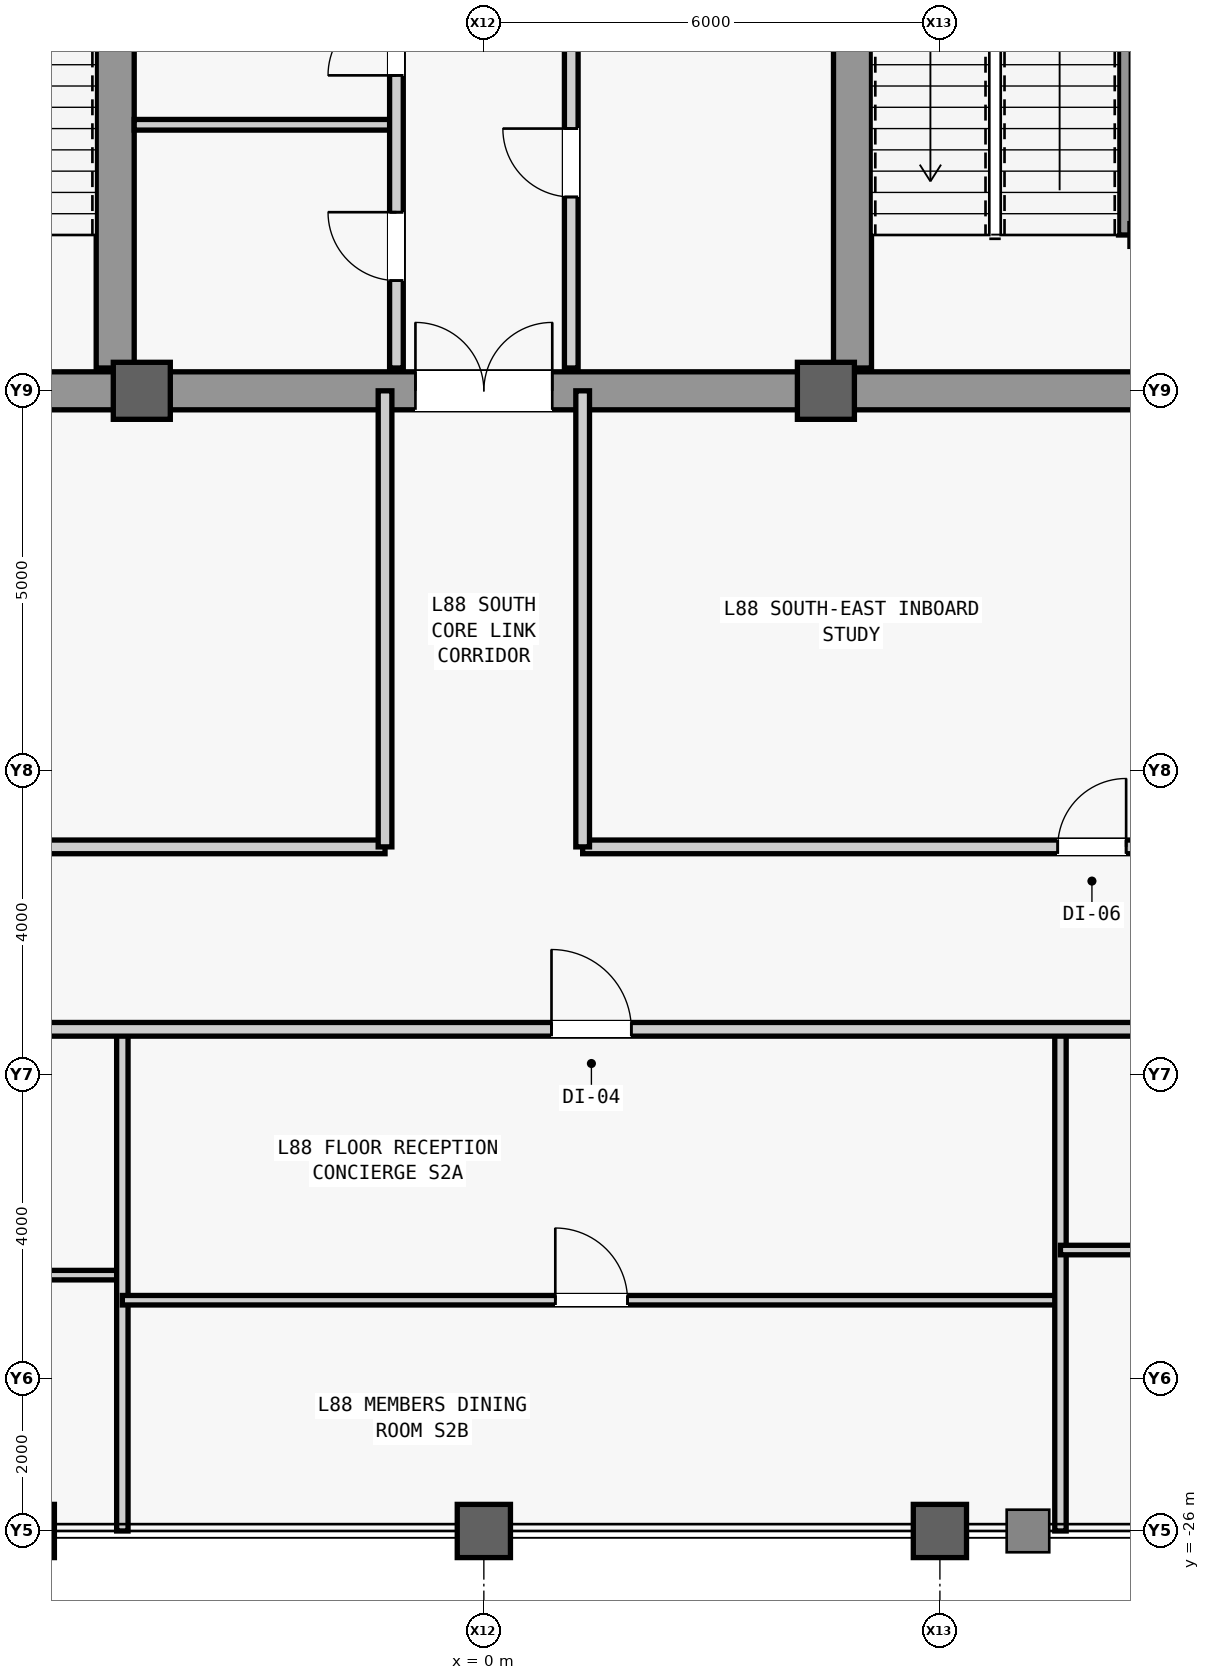
"""IFC4 building model, lengths in metres.
Left out: names, types, materials, properties, quantities, classifications, styles, units other than length and angle.
Written with IfcOpenShell. Run it as: python <this file> out.ifc"""

import sys

from ifc_helpers import new_model, si_unit, direction, frame, frame_2d, origin, origin_2d, place, context, subcontext, project, spatial, rectangle, hollow_rectangle, extrude, source, transform, mapped, element, fill, save


model = new_model("IFC4")
c1 = context("Model", 3, precision=1e-05, world=origin(), true_north=direction((0.0, 1.0)))
c2 = subcontext(c1, "Body", "Model", "MODEL_VIEW")
j1 = project(units=[si_unit("LENGTHUNIT", "METRE"), si_unit("PLANEANGLEUNIT", "RADIAN")], contexts=[c1])
p1 = place(None, origin())
s1 = spatial("IfcSite", under=j1, at=p1, CompositionType="ELEMENT")
p2 = place(p1, origin())
s2 = spatial("IfcBuilding", under=s1, at=p2, CompositionType="ELEMENT")
p3 = place(p2, frame((0.0, 0.0, 370.3)))
s3 = spatial("IfcBuildingStorey", under=s2, at=p3, CompositionType="ELEMENT", Elevation=370.3)
m1 = source(origin(), c2, "Body", "SweptSolid", [
    extrude(rectangle(XDim=21.4, YDim=0.5, at=frame_2d((10.7, 0.0))), origin(), (0.0, 0.0, 1.0), 4.6),
])
for number, where, z_axis, x_axis in (
    (1, (-4.85, -10.7, 0.0), (0.0, 0.0, 1.0), (0.0, 1.0, 0.0)),
    (2, (4.85, -10.7, 0.0), (0.0, 0.0, 1.0), (0.0, 1.0, 0.0)),
):
    element("IfcWall", number, at=place(p3, frame(where, z_axis=z_axis, x_axis=x_axis)), inside=s3, PredefinedType="SHEAR", context=c2, shape_type="MappedRepresentation", body=[
        mapped(m1, transform((0.0, 0.0, 0.0), scale=1.0)),
    ])
m2 = source(origin(), c2, "Body", "SweptSolid", [
    extrude(rectangle(XDim=5.9, YDim=0.5, at=frame_2d((2.95, 0.0))), origin(), (0.0, 0.0, 1.0), 4.6),
])
for number, where, z_axis, x_axis in (
    (3, (-10.75, -11.0, 0.0), (0.0, 0.0, 1.0), (1.0, 0.0, 0.0)),
    (4, (4.85, -11.0, 0.0), (0.0, 0.0, 1.0), (1.0, 0.0, 0.0)),
):
    element("IfcWall", number, at=place(p3, frame(where, z_axis=z_axis, x_axis=x_axis)), inside=s3, PredefinedType="SHEAR", context=c2, shape_type="MappedRepresentation", body=[
        mapped(m2, transform((0.0, 0.0, 0.0), scale=1.0)),
    ])
m3 = source(origin(), c2, "Body", "SweptSolid", [
    extrude(rectangle(XDim=9.2, YDim=0.5, at=frame_2d((4.6, 0.0))), origin(), (0.0, 0.0, 1.0), 4.6),
])
p4 = place(p3, frame((-4.6, -11.0, 0.0), z_axis=(0.0, 0.0, 1.0), x_axis=(1.0, 0.0, 0.0)))
e5 = element("IfcWall", 5, at=p4, inside=s3, PredefinedType="SHEAR", context=c2, shape_type="MappedRepresentation", body=[
    mapped(m3, transform((0.0, 0.0, 0.0), scale=1.0)),
])
m4 = source(origin(), c2, "Body", "SweptSolid", [
    extrude(rectangle(XDim=1.8, YDim=2.25, at=frame_2d((0.9, 1.125))), frame((0.0, 0.26, 0.0), z_axis=(0.0, -1.0, 0.0), x_axis=(1.0, 0.0, 0.0)), (0.0, 0.0, 1.0), 0.52),
])
p5 = place(p4, frame((3.7, 0.0, 0.0)))
e6 = element("IfcOpeningElement", 6, at=p5, cuts=e5, PredefinedType="OPENING", context=c2, shape_type="MappedRepresentation", body=[
    mapped(m4, transform((0.0, 0.0, 0.0), scale=1.0)),
])
m5 = source(origin(), c2, "Body", "SweptSolid", [
    extrude(hollow_rectangle(XDim=0.7, YDim=0.7, WallThickness=0.04, at=origin_2d()), origin(), (0.0, 0.0, 1.0), 5.2),
])
p6 = place(p3, frame((-6.0, -26.0, 0.0), z_axis=(0.0, 0.0, 1.0), x_axis=(1.0, 0.0, 0.0)))
e7 = element("IfcColumn", 7, at=p6, inside=s3, PredefinedType="COLUMN", context=c2, shape_type="MappedRepresentation", body=[
    mapped(m5, transform((0.0, 0.0, 0.0), scale=1.0)),
])
m6 = source(origin(), c2, "Body", "SweptSolid", [
    extrude(rectangle(XDim=0.75, YDim=0.75, at=origin_2d()), origin(), (0.0, 0.0, 1.0), 5.2),
])
p7 = place(p3, frame((-4.5, -11.0, 0.0), z_axis=(0.0, 0.0, 1.0), x_axis=(1.0, 0.0, 0.0)))
e8 = element("IfcColumn", 8, at=p7, inside=s3, PredefinedType="COLUMN", context=c2, shape_type="MappedRepresentation", body=[
    mapped(m6, transform((0.0, 0.0, 0.0), scale=1.0)),
])
p8 = place(p3, frame((0.0, -26.0, 0.0), z_axis=(0.0, 0.0, 1.0), x_axis=(1.0, 0.0, 0.0)))
e9 = element("IfcColumn", 9, at=p8, inside=s3, PredefinedType="COLUMN", context=c2, shape_type="MappedRepresentation", body=[
    mapped(m5, transform((0.0, 0.0, 0.0), scale=1.0)),
])
p9 = place(p3, frame((4.5, -11.0, 0.0), z_axis=(0.0, 0.0, 1.0), x_axis=(1.0, 0.0, 0.0)))
e10 = element("IfcColumn", 10, at=p9, inside=s3, PredefinedType="COLUMN", context=c2, shape_type="MappedRepresentation", body=[
    mapped(m6, transform((0.0, 0.0, 0.0), scale=1.0)),
])
p10 = place(p3, frame((6.0, -26.0, 0.0), z_axis=(0.0, 0.0, 1.0), x_axis=(1.0, 0.0, 0.0)))
e11 = element("IfcColumn", 11, at=p10, inside=s3, PredefinedType="COLUMN", context=c2, shape_type="MappedRepresentation", body=[
    mapped(m5, transform((0.0, 0.0, 0.0), scale=1.0)),
])
m7 = source(origin(), c2, "Body", "SweptSolid", [
    extrude(rectangle(XDim=7.8, YDim=0.3, at=frame_2d((3.9, 0.0))), origin(), (0.0, 0.0, 1.0), 4.6),
])
p11 = place(p3, frame((8.5, -8.95, 0.0), z_axis=(0.0, 0.0, 1.0), x_axis=(0.0, 1.0, 0.0)))
e12 = element("IfcWall", 12, at=p11, inside=s3, PredefinedType="SHEAR", context=c2, shape_type="MappedRepresentation", body=[
    mapped(m7, transform((0.0, 0.0, 0.0), scale=1.0)),
])
m8 = source(origin(), c2, "Body", "SweptSolid", [
    extrude(rectangle(XDim=2.2, YDim=0.3, at=frame_2d((1.1, 0.0))), origin(), (0.0, 0.0, 1.0), 4.6),
])
p12 = place(p3, frame((8.5, -8.95, 0.0), z_axis=(0.0, 0.0, 1.0), x_axis=(1.0, 0.0, 0.0)))
e13 = element("IfcWall", 13, at=p12, inside=s3, PredefinedType="SHEAR", context=c2, shape_type="MappedRepresentation", body=[
    mapped(m8, transform((0.0, 0.0, 0.0), scale=1.0)),
])
m9 = source(origin(), c2, "Body", "SweptSolid", [
    extrude(rectangle(XDim=3.45, YDim=0.14, at=frame_2d((1.725, 0.0))), origin(), (0.0, 0.0, 1.0), 4.6),
])
p13 = place(p3, frame((-4.6, -7.5, 0.0), z_axis=(0.0, 0.0, 1.0), x_axis=(1.0, 0.0, 0.0)))
e14 = element("IfcWall", 14, at=p13, inside=s3, PredefinedType="PARTITIONING", context=c2, shape_type="MappedRepresentation", body=[
    mapped(m9, transform((0.0, 0.0, 0.0), scale=1.0)),
])
m10 = source(origin(), c2, "Body", "SweptSolid", [
    extrude(rectangle(XDim=5.4, YDim=0.18, at=frame_2d((2.7, 0.0))), origin(), (0.0, 0.0, 1.0), 4.6),
])
p14 = place(p3, frame((-1.15, -10.7, 0.0), z_axis=(0.0, 0.0, 1.0), x_axis=(0.0, 1.0, 0.0)))
e15 = element("IfcWall", 15, at=p14, inside=s3, PredefinedType="PARTITIONING", context=c2, shape_type="MappedRepresentation", body=[
    mapped(m10, transform((0.0, 0.0, 0.0), scale=1.0)),
])
m11 = source(origin(), c2, "Body", "SweptSolid", [
    extrude(rectangle(XDim=0.9, YDim=2.15, at=frame_2d((0.45, 1.075))), frame((0.0, 0.1, 0.0), z_axis=(0.0, -1.0, 0.0), x_axis=(1.0, 0.0, 0.0)), (0.0, 0.0, 1.0), 0.2),
])
p15 = place(p14, frame((1.15, 0.0, 0.0)))
e16 = element("IfcOpeningElement", 16, at=p15, cuts=e15, PredefinedType="OPENING", context=c2, shape_type="MappedRepresentation", body=[
    mapped(m11, transform((0.0, 0.0, 0.0), scale=1.0)),
])
p16 = place(p14, frame((3.85, 0.0, 0.0)))
e17 = element("IfcOpeningElement", 17, at=p16, cuts=e15, PredefinedType="OPENING", context=c2, shape_type="MappedRepresentation", body=[
    mapped(m11, transform((0.0, 0.0, 0.0), scale=1.0)),
])
p17 = place(p3, frame((1.15, -10.7, 0.0), z_axis=(0.0, 0.0, 1.0), x_axis=(0.0, 1.0, 0.0)))
e18 = element("IfcWall", 18, at=p17, inside=s3, PredefinedType="PARTITIONING", context=c2, shape_type="MappedRepresentation", body=[
    mapped(m10, transform((0.0, 0.0, 0.0), scale=1.0)),
])
p18 = place(p17, frame((2.25, 0.0, 0.0)))
e19 = element("IfcOpeningElement", 19, at=p18, cuts=e18, PredefinedType="OPENING", context=c2, shape_type="MappedRepresentation", body=[
    mapped(m11, transform((0.0, 0.0, 0.0), scale=1.0)),
])
m12 = source(origin(), c2, "Body", "SweptSolid", [
    extrude(rectangle(XDim=16.1, YDim=0.18, at=frame_2d((8.05, 0.0))), origin(), (0.0, 0.0, 1.0), 4.6),
])
p19 = place(p3, frame((-17.4, -17.0, 0.0), z_axis=(0.0, 0.0, 1.0), x_axis=(1.0, 0.0, 0.0)))
e20 = element("IfcWall", 20, at=p19, inside=s3, PredefinedType="PARTITIONING", context=c2, shape_type="MappedRepresentation", body=[
    mapped(m12, transform((0.0, 0.0, 0.0), scale=1.0)),
])
p20 = place(p19, frame((8.95, 0.0, 0.0)))
e21 = element("IfcOpeningElement", 21, at=p20, cuts=e20, PredefinedType="OPENING", context=c2, shape_type="MappedRepresentation", body=[
    mapped(m11, transform((0.0, 0.0, 0.0), scale=1.0)),
])
m13 = source(origin(), c2, "Body", "SweptSolid", [
    extrude(rectangle(XDim=6.0, YDim=0.18, at=frame_2d((3.0, 0.0))), origin(), (0.0, 0.0, 1.0), 4.6),
])
p21 = place(p3, frame((-1.3, -17.0, 0.0), z_axis=(0.0, 0.0, 1.0), x_axis=(0.0, 1.0, 0.0)))
e22 = element("IfcWall", 22, at=p21, inside=s3, PredefinedType="PARTITIONING", context=c2, shape_type="MappedRepresentation", body=[
    mapped(m13, transform((0.0, 0.0, 0.0), scale=1.0)),
])
m14 = source(origin(), c2, "Body", "SweptSolid", [
    extrude(rectangle(XDim=14.05, YDim=0.18, at=frame_2d((7.025, 0.0))), origin(), (0.0, 0.0, 1.0), 4.6),
])
p22 = place(p3, frame((1.3, -17.0, 0.0), z_axis=(0.0, 0.0, 1.0), x_axis=(1.0, 0.0, 0.0)))
e23 = element("IfcWall", 23, at=p22, inside=s3, PredefinedType="PARTITIONING", context=c2, shape_type="MappedRepresentation", body=[
    mapped(m14, transform((0.0, 0.0, 0.0), scale=1.0)),
])
p23 = place(p22, frame((6.25, 0.0, 0.0)))
e24 = element("IfcOpeningElement", 24, at=p23, cuts=e23, PredefinedType="OPENING", context=c2, shape_type="MappedRepresentation", body=[
    mapped(m11, transform((0.0, 0.0, 0.0), scale=1.0)),
])
p24 = place(p3, frame((1.3, -17.0, 0.0), z_axis=(0.0, 0.0, 1.0), x_axis=(0.0, 1.0, 0.0)))
e25 = element("IfcWall", 25, at=p24, inside=s3, PredefinedType="PARTITIONING", context=c2, shape_type="MappedRepresentation", body=[
    mapped(m13, transform((0.0, 0.0, 0.0), scale=1.0)),
])
m15 = source(origin(), c2, "Body", "SweptSolid", [
    extrude(rectangle(XDim=13.794, YDim=0.125, at=frame_2d((6.897, 0.0))), origin(), (0.0, 0.0, 1.0), 4.6),
])
p25 = place(p3, frame((-18.55, -22.634, 0.0), z_axis=(0.0, 0.0, 1.0), x_axis=(1.0, 0.0, 0.0)))
e26 = element("IfcWall", 26, at=p25, inside=s3, PredefinedType="PARTITIONING", context=c2, shape_type="MappedRepresentation", body=[
    mapped(m15, transform((0.0, 0.0, 0.0), scale=1.0)),
])
m16 = source(origin(), c2, "Body", "SweptSolid", [
    extrude(rectangle(XDim=0.95, YDim=2.15, at=frame_2d((0.475, 1.075))), frame((0.0, 0.073, 0.0), z_axis=(0.0, -1.0, 0.0), x_axis=(1.0, 0.0, 0.0)), (0.0, 0.0, 1.0), 0.145),
])
p26 = place(p25, frame((6.422, 0.0, 0.0)))
e27 = element("IfcOpeningElement", 27, at=p26, cuts=e26, PredefinedType="OPENING", context=c2, shape_type="MappedRepresentation", body=[
    mapped(m16, transform((0.0, 0.0, 0.0), scale=1.0)),
])
m17 = source(origin(), c2, "Body", "SweptSolid", [
    extrude(rectangle(XDim=6.6, YDim=0.15, at=frame_2d((3.3, 0.0))), origin(), (0.0, 0.0, 1.0), 4.6),
])
p27 = place(p3, frame((-4.756, -26.0, 0.0), z_axis=(0.0, 0.0, 1.0), x_axis=(0.0, 1.0, 0.0)))
e28 = element("IfcWall", 28, at=p27, inside=s3, PredefinedType="PARTITIONING", context=c2, shape_type="MappedRepresentation", body=[
    mapped(m17, transform((0.0, 0.0, 0.0), scale=1.0)),
])
m18 = source(origin(), c2, "Body", "SweptSolid", [
    extrude(rectangle(XDim=12.342, YDim=0.125, at=frame_2d((6.171, 0.0))), origin(), (0.0, 0.0, 1.0), 4.6),
])
p28 = place(p3, frame((-4.756, -22.964, 0.0), z_axis=(0.0, 0.0, 1.0), x_axis=(1.0, 0.0, 0.0)))
e29 = element("IfcWall", 29, at=p28, inside=s3, PredefinedType="PARTITIONING", context=c2, shape_type="MappedRepresentation", body=[
    mapped(m18, transform((0.0, 0.0, 0.0), scale=1.0)),
])
p29 = place(p28, frame((5.696, 0.0, 0.0)))
e30 = element("IfcOpeningElement", 30, at=p29, cuts=e29, PredefinedType="OPENING", context=c2, shape_type="MappedRepresentation", body=[
    mapped(m16, transform((0.0, 0.0, 0.0), scale=1.0)),
])
p30 = place(p3, frame((7.586, -26.0, 0.0), z_axis=(0.0, 0.0, 1.0), x_axis=(0.0, 1.0, 0.0)))
e31 = element("IfcWall", 31, at=p30, inside=s3, PredefinedType="PARTITIONING", context=c2, shape_type="MappedRepresentation", body=[
    mapped(m17, transform((0.0, 0.0, 0.0), scale=1.0)),
])
m19 = source(origin(), c2, "Body", "SweptSolid", [
    extrude(rectangle(XDim=10.164, YDim=0.125, at=frame_2d((5.082, 0.0))), origin(), (0.0, 0.0, 1.0), 4.6),
])
p31 = place(p3, frame((7.586, -22.304, 0.0), z_axis=(0.0, 0.0, 1.0), x_axis=(1.0, 0.0, 0.0)))
e32 = element("IfcWall", 32, at=p31, inside=s3, PredefinedType="PARTITIONING", context=c2, shape_type="MappedRepresentation", body=[
    mapped(m19, transform((0.0, 0.0, 0.0), scale=1.0)),
])
p32 = place(p31, frame((4.607, 0.0, 0.0)))
e33 = element("IfcOpeningElement", 33, at=p32, cuts=e32, PredefinedType="OPENING", context=c2, shape_type="MappedRepresentation", body=[
    mapped(m16, transform((0.0, 0.0, 0.0), scale=1.0)),
])
m20 = source(origin(), c2, "Body", "SweptSolid", [
    extrude(rectangle(XDim=36.3, YDim=0.18, at=frame_2d((18.15, 0.0))), origin(), (0.0, 0.0, 1.0), 4.253),
])
p33 = place(p3, frame((-18.55, -19.4, 0.0), z_axis=(0.0, 0.0, 1.0), x_axis=(1.0, 0.0, 0.0)))
e34 = element("IfcWall", 34, at=p33, inside=s3, PredefinedType="PARTITIONING", context=c2, shape_type="MappedRepresentation", body=[
    mapped(m20, transform((0.0, 0.0, 0.0), scale=1.0)),
])
m21 = source(origin(), c2, "Body", "SweptSolid", [
    extrude(rectangle(XDim=1.05, YDim=2.2, at=frame_2d((0.525, 1.1))), frame((0.0, 0.1, 0.0), z_axis=(0.0, -1.0, 0.0), x_axis=(1.0, 0.0, 0.0)), (0.0, 0.0, 1.0), 0.2),
])
p34 = place(p33, frame((6.872, 0.0, 0.0)))
e35 = element("IfcOpeningElement", 35, at=p34, cuts=e34, PredefinedType="OPENING", context=c2, shape_type="MappedRepresentation", body=[
    mapped(m21, transform((0.0, 0.0, 0.0), scale=1.0)),
])
p35 = place(p33, frame((19.44, 0.0, 0.0)))
e36 = element("IfcOpeningElement", 36, at=p35, cuts=e34, PredefinedType="OPENING", context=c2, shape_type="MappedRepresentation", body=[
    mapped(m21, transform((0.0, 0.0, 0.0), scale=1.0)),
])
p36 = place(p33, frame((30.168, 0.0, 0.0)))
e37 = element("IfcOpeningElement", 37, at=p36, cuts=e34, PredefinedType="OPENING", context=c2, shape_type="MappedRepresentation", body=[
    mapped(m21, transform((0.0, 0.0, 0.0), scale=1.0)),
])
m22 = source(origin(), c2, "Body", "SweptSolid", [
    extrude(rectangle(XDim=0.9, YDim=2.15, at=frame_2d((0.45, 1.075))), frame((0.0, 0.025, 0.0), z_axis=(0.0, -1.0, 0.0), x_axis=(1.0, 0.0, 0.0)), (0.0, 0.0, 1.0), 0.05),
])
p37 = place(p15, origin())
e38 = element("IfcDoor", 38, at=p37, inside=s3, OperationType="SINGLE_SWING_RIGHT", PredefinedType="DOOR", context=c2, shape_type="MappedRepresentation", body=[
    mapped(m22, transform((0.0, 0.0, 0.0), scale=1.0)),
])
fill(e16, e38)
p38 = place(p16, origin())
e39 = element("IfcDoor", 39, at=p38, inside=s3, OperationType="SINGLE_SWING_LEFT", PredefinedType="DOOR", context=c2, shape_type="MappedRepresentation", body=[
    mapped(m22, transform((0.0, 0.0, 0.0), scale=1.0)),
])
fill(e17, e39)
p39 = place(p18, origin())
e40 = element("IfcDoor", 40, at=p39, inside=s3, OperationType="SINGLE_SWING_RIGHT", PredefinedType="DOOR", context=c2, shape_type="MappedRepresentation", body=[
    mapped(m22, transform((0.0, 0.0, 0.0), scale=1.0)),
])
fill(e19, e40)
m23 = source(origin(), c2, "Body", "SweptSolid", [
    extrude(rectangle(XDim=1.8, YDim=2.25, at=frame_2d((0.9, 1.125))), frame((0.0, 0.025, 0.0), z_axis=(0.0, -1.0, 0.0), x_axis=(1.0, 0.0, 0.0)), (0.0, 0.0, 1.0), 0.05),
])
p40 = place(p5, origin())
e41 = element("IfcDoor", 41, at=p40, inside=s3, OperationType="SINGLE_SWING_LEFT", PredefinedType="DOOR", context=c2, shape_type="MappedRepresentation", body=[
    mapped(m23, transform((0.0, 0.0, 0.0), scale=1.0)),
])
fill(e6, e41)
p41 = place(p23, origin())
e42 = element("IfcDoor", 42, at=p41, inside=s3, OperationType="SINGLE_SWING_RIGHT", PredefinedType="DOOR", context=c2, shape_type="MappedRepresentation", body=[
    mapped(m22, transform((0.0, 0.0, 0.0), scale=1.0)),
])
fill(e24, e42)
m24 = source(origin(), c2, "Body", "SweptSolid", [
    extrude(rectangle(XDim=0.95, YDim=2.15, at=frame_2d((0.475, 1.075))), frame((0.0, 0.025, 0.0), z_axis=(0.0, -1.0, 0.0), x_axis=(1.0, 0.0, 0.0)), (0.0, 0.0, 1.0), 0.05),
])
p42 = place(p29, origin())
e43 = element("IfcDoor", 43, at=p42, inside=s3, OperationType="SINGLE_SWING_LEFT", PredefinedType="DOOR", context=c2, shape_type="MappedRepresentation", body=[
    mapped(m24, transform((0.0, 0.0, 0.0), scale=1.0)),
])
fill(e30, e43)
m25 = source(origin(), c2, "Body", "SweptSolid", [
    extrude(rectangle(XDim=1.05, YDim=2.2, at=frame_2d((0.525, 1.1))), frame((0.0, 0.025, 0.0), z_axis=(0.0, -1.0, 0.0), x_axis=(1.0, 0.0, 0.0)), (0.0, 0.0, 1.0), 0.05),
])
p43 = place(p35, origin())
e44 = element("IfcDoor", 44, at=p43, inside=s3, OperationType="SINGLE_SWING_LEFT", PredefinedType="DOOR", context=c2, shape_type="MappedRepresentation", body=[
    mapped(m25, transform((0.0, 0.0, 0.0), scale=1.0)),
])
fill(e36, e44)
save(model, sys.argv[1])
